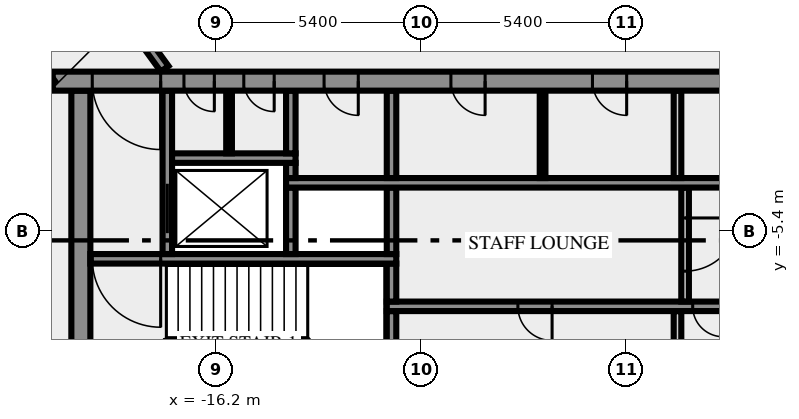
"""IFC4 building model, lengths in metres.
Left out: names, types, materials, properties, quantities, classifications, styles, units other than length and angle.
Written with IfcOpenShell. Run it as: python <this file> out.ifc"""

import sys

from ifc_helpers import new_model, si_unit, direction, frame, frame_2d, origin, place, context, subcontext, project, spatial, rectangle, extrude, element, fill, save


model = new_model("IFC4")
c1 = context("Model", 3, precision=1e-05, world=origin(), true_north=direction((0.0, 1.0)))
c2 = subcontext(c1, "Body", "Model", "MODEL_VIEW")
j1 = project(units=[si_unit("LENGTHUNIT", "METRE"), si_unit("PLANEANGLEUNIT", "RADIAN")], contexts=[c1])
p1 = place(None, origin())
s1 = spatial("IfcSite", under=j1, at=p1, CompositionType="ELEMENT")
p2 = place(p1, origin())
s2 = spatial("IfcBuilding", under=s1, at=p2, CompositionType="ELEMENT")
p3 = place(p2, frame((0.0, 0.0, 238.0)))
s3 = spatial("IfcBuildingStorey", under=s2, at=p3, CompositionType="ELEMENT", Elevation=238.0)
p4 = place(p3, frame((-19.75, -10.5, 0.0), z_axis=(0.0, 0.0, 1.0), x_axis=(0.0, 1.0, 0.0)))
e1 = element("IfcWall", 1, at=p4, inside=s3, PredefinedType="SHEAR", context=c2, shape_type="SweptSolid", body=[
    extrude(rectangle(XDim=8.8, YDim=0.5, at=frame_2d((4.4, 0.0))), origin(), (0.0, 0.0, 1.0), 3.4),
])
p5 = place(p3, frame((-11.575, -10.5, 0.0), z_axis=(0.0, 0.0, 1.0), x_axis=(0.0, 1.0, 0.0)))
e2 = element("IfcWall", 2, at=p5, inside=s3, PredefinedType="SHEAR", context=c2, shape_type="SweptSolid", body=[
    extrude(rectangle(XDim=3.0, YDim=0.25, at=frame_2d((1.5, 0.0))), origin(), (0.0, 0.0, 1.0), 3.4),
])
p6 = place(p3, frame((-4.05, -10.5, 0.0), z_axis=(0.0, 0.0, 1.0), x_axis=(0.0, 1.0, 0.0)))
e3 = element("IfcWall", 3, at=p6, inside=s3, PredefinedType="SOLIDWALL", context=c2, shape_type="SweptSolid", body=[
    extrude(rectangle(XDim=3.0, YDim=0.2, at=frame_2d((1.5, 0.0))), origin(), (0.0, 0.0, 1.0), 3.4),
])
p7 = place(p3, frame((11.7, -7.375, 0.0), z_axis=(0.0, 0.0, 1.0), x_axis=(-1.0, 0.0, 0.0)))
e4 = element("IfcWall", 4, at=p7, inside=s3, PredefinedType="SHEAR", context=c2, shape_type="SweptSolid", body=[
    extrude(rectangle(XDim=23.4, YDim=0.25, at=frame_2d((11.7, 0.0))), origin(), (0.0, 0.0, 1.0), 3.4),
])
p8 = place(p7, frame((19.05, 0.0, 0.0)))
e5 = element("IfcOpeningElement", 5, at=p8, cuts=e4, PredefinedType="OPENING", context=c2, shape_type="SweptSolid", body=[
    extrude(rectangle(XDim=0.9, YDim=2.1, at=frame_2d((0.45, 1.05))), frame((0.0, 0.135, 0.0), z_axis=(0.0, -1.0, 0.0), x_axis=(1.0, 0.0, 0.0)), (0.0, 0.0, 1.0), 0.27),
])
p9 = place(p7, frame((14.55, 0.0, 0.0)))
e6 = element("IfcOpeningElement", 6, at=p9, cuts=e4, PredefinedType="OPENING", context=c2, shape_type="SweptSolid", body=[
    extrude(rectangle(XDim=0.8, YDim=2.1, at=frame_2d((0.4, 1.05))), frame((0.0, 0.135, 0.0), z_axis=(0.0, -1.0, 0.0), x_axis=(1.0, 0.0, 0.0)), (0.0, 0.0, 1.0), 0.27),
])
p10 = place(p7, frame((12.8, 0.0, 0.0)))
e7 = element("IfcOpeningElement", 7, at=p10, cuts=e4, PredefinedType="OPENING", context=c2, shape_type="SweptSolid", body=[
    extrude(rectangle(XDim=0.9, YDim=2.1, at=frame_2d((0.45, 1.05))), frame((0.0, 0.135, 0.0), z_axis=(0.0, -1.0, 0.0), x_axis=(1.0, 0.0, 0.0)), (0.0, 0.0, 1.0), 0.27),
])
p11 = place(p7, frame((10.7, 0.0, 0.0)))
e8 = element("IfcOpeningElement", 8, at=p11, cuts=e4, PredefinedType="OPENING", context=c2, shape_type="SweptSolid", body=[
    extrude(rectangle(XDim=0.9, YDim=2.1, at=frame_2d((0.45, 1.05))), frame((0.0, 0.135, 0.0), z_axis=(0.0, -1.0, 0.0), x_axis=(1.0, 0.0, 0.0)), (0.0, 0.0, 1.0), 0.27),
])
p12 = place(p7, frame((8.35, 0.0, 0.0)))
e9 = element("IfcOpeningElement", 9, at=p12, cuts=e4, PredefinedType="OPENING", context=c2, shape_type="SweptSolid", body=[
    extrude(rectangle(XDim=1.1, YDim=2.1, at=frame_2d((0.55, 1.05))), frame((0.0, 0.135, 0.0), z_axis=(0.0, -1.0, 0.0), x_axis=(1.0, 0.0, 0.0)), (0.0, 0.0, 1.0), 0.27),
])
p13 = place(p7, frame((5.85, 0.0, 0.0)))
e10 = element("IfcOpeningElement", 10, at=p13, cuts=e4, PredefinedType="OPENING", context=c2, shape_type="SweptSolid", body=[
    extrude(rectangle(XDim=1.1, YDim=2.1, at=frame_2d((0.55, 1.05))), frame((0.0, 0.135, 0.0), z_axis=(0.0, -1.0, 0.0), x_axis=(1.0, 0.0, 0.0)), (0.0, 0.0, 1.0), 0.27),
])
p14 = place(p7, frame((3.35, 0.0, 0.0)))
e11 = element("IfcOpeningElement", 11, at=p14, cuts=e4, PredefinedType="OPENING", context=c2, shape_type="SweptSolid", body=[
    extrude(rectangle(XDim=1.1, YDim=2.1, at=frame_2d((0.55, 1.05))), frame((0.0, 0.135, 0.0), z_axis=(0.0, -1.0, 0.0), x_axis=(1.0, 0.0, 0.0)), (0.0, 0.0, 1.0), 0.27),
])
p15 = place(p7, frame((0.85, 0.0, 0.0)))
e12 = element("IfcOpeningElement", 12, at=p15, cuts=e4, PredefinedType="OPENING", context=c2, shape_type="SweptSolid", body=[
    extrude(rectangle(XDim=1.1, YDim=2.1, at=frame_2d((0.55, 1.05))), frame((0.0, 0.135, 0.0), z_axis=(0.0, -1.0, 0.0), x_axis=(1.0, 0.0, 0.0)), (0.0, 0.0, 1.0), 0.27),
])
p16 = place(p3, frame((-11.575, -7.25, 0.0), z_axis=(0.0, 0.0, 1.0), x_axis=(0.0, 1.0, 0.0)))
e13 = element("IfcWall", 13, at=p16, inside=s3, PredefinedType="SHEAR", context=c2, shape_type="SweptSolid", body=[
    extrude(rectangle(XDim=1.0, YDim=0.25, at=frame_2d((0.5, 0.0))), origin(), (0.0, 0.0, 1.0), 3.4),
])
p17 = place(p3, frame((-3.85, -4.25, 0.0), z_axis=(0.0, 0.0, 1.0), x_axis=(0.0, -1.0, 0.0)))
e14 = element("IfcWall", 14, at=p17, inside=s3, PredefinedType="SOLIDWALL", context=c2, shape_type="SweptSolid", body=[
    extrude(rectangle(XDim=3.0, YDim=0.2, at=frame_2d((1.5, 0.0))), origin(), (0.0, 0.0, 1.0), 3.4),
])
p18 = place(p17, frame((0.8, 0.0, 0.0)))
e15 = element("IfcOpeningElement", 15, at=p18, cuts=e14, PredefinedType="OPENING", context=c2, shape_type="SweptSolid", body=[
    extrude(rectangle(XDim=1.4, YDim=2.1, at=frame_2d((0.7, 1.05))), frame((0.0, 0.11, 0.0), z_axis=(0.0, -1.0, 0.0), x_axis=(1.0, 0.0, 0.0)), (0.0, 0.0, 1.0), 0.22),
])
p19 = place(p3, frame((-11.45, -6.125, 0.0), z_axis=(0.0, 0.0, 1.0), x_axis=(-1.0, 0.0, 0.0)))
e16 = element("IfcWall", 16, at=p19, inside=s3, PredefinedType="SHEAR", context=c2, shape_type="SweptSolid", body=[
    extrude(rectangle(XDim=8.05, YDim=0.25, at=frame_2d((4.025, 0.0))), origin(), (0.0, 0.0, 1.0), 3.4),
])
p20 = place(p19, frame((6.2, 0.0, 0.0)))
e17 = element("IfcOpeningElement", 17, at=p20, cuts=e16, PredefinedType="OPENING", context=c2, shape_type="SweptSolid", body=[
    extrude(rectangle(XDim=1.8, YDim=2.1, at=frame_2d((0.9, 1.05))), frame((0.0, 0.135, 0.0), z_axis=(0.0, -1.0, 0.0), x_axis=(1.0, 0.0, 0.0)), (0.0, 0.0, 1.0), 0.27),
])
p21 = place(p3, frame((-17.475, -6.0, 0.0), z_axis=(0.0, 0.0, 1.0), x_axis=(0.0, 1.0, 0.0)))
e18 = element("IfcWall", 18, at=p21, inside=s3, PredefinedType="SHEAR", context=c2, shape_type="SweptSolid", body=[
    extrude(rectangle(XDim=4.3, YDim=0.25, at=frame_2d((2.15, 0.0))), origin(), (0.0, 0.0, 1.0), 3.4),
])
p22 = place(p21, frame((0.55, 0.0, 0.0)))
e19 = element("IfcOpeningElement", 19, at=p22, cuts=e18, PredefinedType="OPENING", context=c2, shape_type="SweptSolid", body=[
    extrude(rectangle(XDim=1.3, YDim=2.1, at=frame_2d((0.65, 1.05))), frame((0.0, 0.135, 0.0), z_axis=(0.0, -1.0, 0.0), x_axis=(1.0, 0.0, 0.0)), (0.0, 0.0, 1.0), 0.27),
])
for number, where, z_axis, x_axis in (
    (20, (-14.225, -6.0, 0.0), (0.0, 0.0, 1.0), (0.0, 1.0, 0.0)),
    (21, (-11.575, -6.0, 0.0), (0.0, 0.0, 1.0), (0.0, 1.0, 0.0)),
):
    element("IfcWall", number, at=place(p3, frame(where, z_axis=z_axis, x_axis=x_axis)), inside=s3, PredefinedType="SHEAR", context=c2, shape_type="SweptSolid", body=[
        extrude(rectangle(XDim=1.75, YDim=0.25, at=frame_2d((0.875, 0.0))), origin(), (0.0, 0.0, 1.0), 3.4),
    ])
p23 = place(p3, frame((-14.35, -4.125, 0.0), z_axis=(0.0, 0.0, 1.0), x_axis=(1.0, 0.0, 0.0)))
e22 = element("IfcWall", 22, at=p23, inside=s3, PredefinedType="SHEAR", context=c2, shape_type="SweptSolid", body=[
    extrude(rectangle(XDim=12.7, YDim=0.25, at=frame_2d((6.35, 0.0))), origin(), (0.0, 0.0, 1.0), 3.4),
])
p24 = place(p3, frame((-14.225, -4.0, 0.0), z_axis=(0.0, 0.0, 1.0), x_axis=(0.0, 1.0, 0.0)))
e23 = element("IfcWall", 23, at=p24, inside=s3, PredefinedType="SHEAR", context=c2, shape_type="SweptSolid", body=[
    extrude(rectangle(XDim=0.4, YDim=0.25, at=frame_2d((0.2, 0.0))), origin(), (0.0, 0.0, 1.0), 3.4),
])
p25 = place(p3, frame((-11.575, -4.0, 0.0), z_axis=(0.0, 0.0, 1.0), x_axis=(0.0, 1.0, 0.0)))
e24 = element("IfcWall", 24, at=p25, inside=s3, PredefinedType="SHEAR", context=c2, shape_type="SweptSolid", body=[
    extrude(rectangle(XDim=2.3, YDim=0.25, at=frame_2d((1.15, 0.0))), origin(), (0.0, 0.0, 1.0), 3.4),
])
p26 = place(p3, frame((-7.6, -4.0, 0.0), z_axis=(0.0, 0.0, 1.0), x_axis=(0.0, 1.0, 0.0)))
e25 = element("IfcWall", 25, at=p26, inside=s3, PredefinedType="PARTITIONING", context=c2, shape_type="SweptSolid", body=[
    extrude(rectangle(XDim=2.3, YDim=0.15, at=frame_2d((1.15, 0.0))), origin(), (0.0, 0.0, 1.0), 3.4),
])
p27 = place(p3, frame((-4.05, -4.0, 0.0), z_axis=(0.0, 0.0, 1.0), x_axis=(0.0, 1.0, 0.0)))
e26 = element("IfcWall", 26, at=p27, inside=s3, PredefinedType="SOLIDWALL", context=c2, shape_type="SweptSolid", body=[
    extrude(rectangle(XDim=2.3, YDim=0.2, at=frame_2d((1.15, 0.0))), origin(), (0.0, 0.0, 1.0), 3.4),
])
p28 = place(p3, frame((-17.35, -3.475, 0.0), z_axis=(0.0, 0.0, 1.0), x_axis=(1.0, 0.0, 0.0)))
e27 = element("IfcWall", 27, at=p28, inside=s3, PredefinedType="SHEAR", context=c2, shape_type="SweptSolid", body=[
    extrude(rectangle(XDim=3.25, YDim=0.25, at=frame_2d((1.625, 0.0))), origin(), (0.0, 0.0, 1.0), 3.4),
])
p29 = place(p3, frame((-15.85, -3.35, 0.0), z_axis=(0.0, 0.0, 1.0), x_axis=(0.0, 1.0, 0.0)))
e28 = element("IfcWall", 28, at=p29, inside=s3, PredefinedType="PARTITIONING", context=c2, shape_type="SweptSolid", body=[
    extrude(rectangle(XDim=1.65, YDim=0.15, at=frame_2d((0.825, 0.0))), origin(), (0.0, 0.0, 1.0), 3.4),
])
p30 = place(p3, frame((-14.225, -3.35, 0.0), z_axis=(0.0, 0.0, 1.0), x_axis=(0.0, 1.0, 0.0)))
e29 = element("IfcWall", 29, at=p30, inside=s3, PredefinedType="SHEAR", context=c2, shape_type="SweptSolid", body=[
    extrude(rectangle(XDim=1.65, YDim=0.25, at=frame_2d((0.825, 0.0))), origin(), (0.0, 0.0, 1.0), 3.4),
])
p31 = place(p3, frame((20.49, -1.45, 0.0), z_axis=(0.0, 0.0, 1.0), x_axis=(-1.0, 0.0, 0.0)))
e30 = element("IfcWall", 30, at=p31, inside=s3, PredefinedType="SHEAR", context=c2, shape_type="SweptSolid", body=[
    extrude(rectangle(XDim=40.98, YDim=0.5, at=frame_2d((20.49, 0.0))), origin(), (0.0, 0.0, 1.0), 3.4),
])
p32 = place(p31, frame((38.14, 0.0, 0.0)))
e31 = element("IfcOpeningElement", 31, at=p32, cuts=e30, PredefinedType="OPENING", context=c2, shape_type="SweptSolid", body=[
    extrude(rectangle(XDim=1.8, YDim=2.1, at=frame_2d((0.9, 1.05))), frame((0.0, 0.26, 0.0), z_axis=(0.0, -1.0, 0.0), x_axis=(1.0, 0.0, 0.0)), (0.0, 0.0, 1.0), 0.52),
])
p33 = place(p31, frame((36.728, 0.0, 0.0)))
e32 = element("IfcOpeningElement", 32, at=p33, cuts=e30, PredefinedType="OPENING", context=c2, shape_type="SweptSolid", body=[
    extrude(rectangle(XDim=0.8, YDim=2.1, at=frame_2d((0.4, 1.05))), frame((0.0, 0.26, 0.0), z_axis=(0.0, -1.0, 0.0), x_axis=(1.0, 0.0, 0.0)), (0.0, 0.0, 1.0), 0.52),
])
p34 = place(p31, frame((35.153, 0.0, 0.0)))
e33 = element("IfcOpeningElement", 33, at=p34, cuts=e30, PredefinedType="OPENING", context=c2, shape_type="SweptSolid", body=[
    extrude(rectangle(XDim=0.8, YDim=2.1, at=frame_2d((0.4, 1.05))), frame((0.0, 0.26, 0.0), z_axis=(0.0, -1.0, 0.0), x_axis=(1.0, 0.0, 0.0)), (0.0, 0.0, 1.0), 0.52),
])
p35 = place(p31, frame((32.94, 0.0, 0.0)))
e34 = element("IfcOpeningElement", 34, at=p35, cuts=e30, PredefinedType="OPENING", context=c2, shape_type="SweptSolid", body=[
    extrude(rectangle(XDim=0.9, YDim=2.1, at=frame_2d((0.45, 1.05))), frame((0.0, 0.26, 0.0), z_axis=(0.0, -1.0, 0.0), x_axis=(1.0, 0.0, 0.0)), (0.0, 0.0, 1.0), 0.52),
])
p36 = place(p31, frame((29.603, 0.0, 0.0)))
e35 = element("IfcOpeningElement", 35, at=p36, cuts=e30, PredefinedType="OPENING", context=c2, shape_type="SweptSolid", body=[
    extrude(rectangle(XDim=0.9, YDim=2.1, at=frame_2d((0.45, 1.05))), frame((0.0, 0.26, 0.0), z_axis=(0.0, -1.0, 0.0), x_axis=(1.0, 0.0, 0.0)), (0.0, 0.0, 1.0), 0.52),
])
p37 = place(p31, frame((25.877, 0.0, 0.0)))
e36 = element("IfcOpeningElement", 36, at=p37, cuts=e30, PredefinedType="OPENING", context=c2, shape_type="SweptSolid", body=[
    extrude(rectangle(XDim=0.9, YDim=2.1, at=frame_2d((0.45, 1.05))), frame((0.0, 0.26, 0.0), z_axis=(0.0, -1.0, 0.0), x_axis=(1.0, 0.0, 0.0)), (0.0, 0.0, 1.0), 0.52),
])
p38 = place(p31, frame((19.59, 0.0, 0.0)))
e37 = element("IfcOpeningElement", 37, at=p38, cuts=e30, PredefinedType="OPENING", context=c2, shape_type="SweptSolid", body=[
    extrude(rectangle(XDim=2.0, YDim=2.1, at=frame_2d((1.0, 1.05))), frame((0.0, 0.26, 0.0), z_axis=(0.0, -1.0, 0.0), x_axis=(1.0, 0.0, 0.0)), (0.0, 0.0, 1.0), 0.52),
])
p39 = place(p31, frame((7.14, 0.0, 0.0)))
e38 = element("IfcOpeningElement", 38, at=p39, cuts=e30, PredefinedType="OPENING", context=c2, shape_type="SweptSolid", body=[
    extrude(rectangle(XDim=0.9, YDim=2.1, at=frame_2d((0.45, 1.05))), frame((0.0, 0.26, 0.0), z_axis=(0.0, -1.0, 0.0), x_axis=(1.0, 0.0, 0.0)), (0.0, 0.0, 1.0), 0.52),
])
p40 = place(p31, frame((4.19, 0.0, 0.0)))
e39 = element("IfcOpeningElement", 39, at=p40, cuts=e30, PredefinedType="OPENING", context=c2, shape_type="SweptSolid", body=[
    extrude(rectangle(XDim=0.9, YDim=2.1, at=frame_2d((0.45, 1.05))), frame((0.0, 0.26, 0.0), z_axis=(0.0, -1.0, 0.0), x_axis=(1.0, 0.0, 0.0)), (0.0, 0.0, 1.0), 0.52),
])
p41 = place(p31, frame((1.04, 0.0, 0.0)))
e40 = element("IfcOpeningElement", 40, at=p41, cuts=e30, PredefinedType="OPENING", context=c2, shape_type="SweptSolid", body=[
    extrude(rectangle(XDim=1.8, YDim=2.1, at=frame_2d((0.9, 1.05))), frame((0.0, 0.26, 0.0), z_axis=(0.0, -1.0, 0.0), x_axis=(1.0, 0.0, 0.0)), (0.0, 0.0, 1.0), 0.52),
])
p42 = place(p3, frame((-20.531, -1.523, 0.0), z_axis=(0.0, 0.0, 1.0), x_axis=(-0.587781654618, 0.809019608226, 0.0)))
e41 = element("IfcWall", 41, at=p42, inside=s3, PredefinedType="SOLIDWALL", context=c2, shape_type="SweptSolid", body=[
    extrude(rectangle(XDim=33.911, YDim=0.25, at=frame_2d((16.956, 0.0))), origin(), (0.0, 0.0, 1.0), 3.4),
])
p43 = place(p42, frame((14.216, 0.0, 0.0)))
e42 = element("IfcOpeningElement", 42, at=p43, cuts=e41, PredefinedType="OPENING", context=c2, shape_type="SweptSolid", body=[
    extrude(rectangle(XDim=1.0, YDim=2.1, at=frame_2d((0.5, 1.05))), frame((0.0, 0.135, 0.0), z_axis=(0.0, -1.0, 0.0), x_axis=(1.0, 0.0, 0.0)), (0.0, 0.0, 1.0), 0.27),
])
p44 = place(p42, frame((19.715, 0.0, 0.0)))
e43 = element("IfcOpeningElement", 43, at=p44, cuts=e41, PredefinedType="OPENING", context=c2, shape_type="SweptSolid", body=[
    extrude(rectangle(XDim=0.9, YDim=2.1, at=frame_2d((0.45, 1.05))), frame((0.0, 0.135, 0.0), z_axis=(0.0, -1.0, 0.0), x_axis=(1.0, 0.0, 0.0)), (0.0, 0.0, 1.0), 0.27),
])
p45 = place(p42, frame((21.316, 0.0, 0.0)))
e44 = element("IfcOpeningElement", 44, at=p45, cuts=e41, PredefinedType="OPENING", context=c2, shape_type="SweptSolid", body=[
    extrude(rectangle(XDim=0.9, YDim=2.1, at=frame_2d((0.45, 1.05))), frame((0.0, 0.135, 0.0), z_axis=(0.0, -1.0, 0.0), x_axis=(1.0, 0.0, 0.0)), (0.0, 0.0, 1.0), 0.27),
])
p46 = place(p3, frame((-38.32, 27.469, 0.0), z_axis=(0.0, 0.0, 1.0), x_axis=(0.587788021768, -0.809014982226, 0.0)))
e45 = element("IfcWall", 45, at=p46, inside=s3, PredefinedType="SOLIDWALL", context=c2, shape_type="SweptSolid", body=[
    extrude(rectangle(XDim=35.344, YDim=0.25, at=frame_2d((17.672, 0.0))), origin(), (0.0, 0.0, 1.0), 3.4),
])
p47 = place(p46, frame((31.003, 0.0, 0.0)))
e46 = element("IfcOpeningElement", 46, at=p47, cuts=e45, PredefinedType="OPENING", context=c2, shape_type="SweptSolid", body=[
    extrude(rectangle(XDim=0.9, YDim=2.1, at=frame_2d((0.45, 1.05))), frame((0.0, 0.135, 0.0), z_axis=(0.0, -1.0, 0.0), x_axis=(1.0, 0.0, 0.0)), (0.0, 0.0, 1.0), 0.27),
])
p48 = place(p46, frame((11.286, 0.0, 0.0)))
e47 = element("IfcOpeningElement", 47, at=p48, cuts=e45, PredefinedType="OPENING", context=c2, shape_type="SweptSolid", body=[
    extrude(rectangle(XDim=0.9, YDim=2.1, at=frame_2d((0.45, 1.05))), frame((0.0, 0.135, 0.0), z_axis=(0.0, -1.0, 0.0), x_axis=(1.0, 0.0, 0.0)), (0.0, 0.0, 1.0), 0.27),
])
p49 = place(p8, origin())
e48 = element("IfcDoor", 48, at=p49, inside=s3, OperationType="SINGLE_SWING_RIGHT", PredefinedType="DOOR", context=c2, shape_type="SweptSolid", body=[
    extrude(rectangle(XDim=0.9, YDim=2.1, at=frame_2d((0.45, 1.05))), frame((0.0, 0.025, 0.0), z_axis=(0.0, -1.0, 0.0), x_axis=(1.0, 0.0, 0.0)), (0.0, 0.0, 1.0), 0.05),
])
fill(e5, e48)
p50 = place(p9, origin())
e49 = element("IfcDoor", 49, at=p50, inside=s3, OperationType="SINGLE_SWING_RIGHT", PredefinedType="DOOR", context=c2, shape_type="SweptSolid", body=[
    extrude(rectangle(XDim=0.8, YDim=2.1, at=frame_2d((0.4, 1.05))), frame((0.0, 0.025, 0.0), z_axis=(0.0, -1.0, 0.0), x_axis=(1.0, 0.0, 0.0)), (0.0, 0.0, 1.0), 0.05),
])
fill(e6, e49)
p51 = place(p18, origin())
e50 = element("IfcDoor", 50, at=p51, inside=s3, OperationType="DOUBLE_DOOR_SINGLE_SWING", PredefinedType="DOOR", context=c2, shape_type="SweptSolid", body=[
    extrude(rectangle(XDim=1.4, YDim=2.1, at=frame_2d((0.7, 1.05))), frame((0.0, 0.025, 0.0), z_axis=(0.0, -1.0, 0.0), x_axis=(1.0, 0.0, 0.0)), (0.0, 0.0, 1.0), 0.05),
])
fill(e15, e50)
p52 = place(p20, origin())
e51 = element("IfcDoor", 51, at=p52, inside=s3, OperationType="DOUBLE_DOOR_SINGLE_SWING", PredefinedType="DOOR", context=c2, shape_type="SweptSolid", body=[
    extrude(rectangle(XDim=1.8, YDim=2.1, at=frame_2d((0.9, 1.05))), frame((0.0, 0.025, 0.0), z_axis=(0.0, -1.0, 0.0), x_axis=(1.0, 0.0, 0.0)), (0.0, 0.0, 1.0), 0.05),
])
fill(e17, e51)
p53 = place(p22, origin())
e52 = element("IfcDoor", 52, at=p53, inside=s3, OperationType="DOUBLE_DOOR_SLIDING", PredefinedType="DOOR", context=c2, shape_type="SweptSolid", body=[
    extrude(rectangle(XDim=1.3, YDim=2.1, at=frame_2d((0.65, 1.05))), frame((0.0, 0.025, 0.0), z_axis=(0.0, -1.0, 0.0), x_axis=(1.0, 0.0, 0.0)), (0.0, 0.0, 1.0), 0.05),
])
fill(e19, e52)
p54 = place(p32, origin())
e53 = element("IfcDoor", 53, at=p54, inside=s3, OperationType="DOUBLE_DOOR_SINGLE_SWING", PredefinedType="DOOR", context=c2, shape_type="SweptSolid", body=[
    extrude(rectangle(XDim=1.8, YDim=2.1, at=frame_2d((0.9, 1.05))), frame((0.0, 0.025, 0.0), z_axis=(0.0, -1.0, 0.0), x_axis=(1.0, 0.0, 0.0)), (0.0, 0.0, 1.0), 0.05),
])
fill(e31, e53)
p55 = place(p33, origin())
e54 = element("IfcDoor", 54, at=p55, inside=s3, OperationType="SINGLE_SWING_RIGHT", PredefinedType="DOOR", context=c2, shape_type="SweptSolid", body=[
    extrude(rectangle(XDim=0.8, YDim=2.1, at=frame_2d((0.4, 1.05))), frame((0.0, 0.025, 0.0), z_axis=(0.0, -1.0, 0.0), x_axis=(1.0, 0.0, 0.0)), (0.0, 0.0, 1.0), 0.05),
])
fill(e32, e54)
p56 = place(p34, origin())
e55 = element("IfcDoor", 55, at=p56, inside=s3, OperationType="SINGLE_SWING_RIGHT", PredefinedType="DOOR", context=c2, shape_type="SweptSolid", body=[
    extrude(rectangle(XDim=0.8, YDim=2.1, at=frame_2d((0.4, 1.05))), frame((0.0, 0.025, 0.0), z_axis=(0.0, -1.0, 0.0), x_axis=(1.0, 0.0, 0.0)), (0.0, 0.0, 1.0), 0.05),
])
fill(e33, e55)
p57 = place(p35, origin())
e56 = element("IfcDoor", 56, at=p57, inside=s3, OperationType="SINGLE_SWING_RIGHT", PredefinedType="DOOR", context=c2, shape_type="SweptSolid", body=[
    extrude(rectangle(XDim=0.9, YDim=2.1, at=frame_2d((0.45, 1.05))), frame((0.0, 0.025, 0.0), z_axis=(0.0, -1.0, 0.0), x_axis=(1.0, 0.0, 0.0)), (0.0, 0.0, 1.0), 0.05),
])
fill(e34, e56)
p58 = place(p36, origin())
e57 = element("IfcDoor", 57, at=p58, inside=s3, OperationType="SINGLE_SWING_RIGHT", PredefinedType="DOOR", context=c2, shape_type="SweptSolid", body=[
    extrude(rectangle(XDim=0.9, YDim=2.1, at=frame_2d((0.45, 1.05))), frame((0.0, 0.025, 0.0), z_axis=(0.0, -1.0, 0.0), x_axis=(1.0, 0.0, 0.0)), (0.0, 0.0, 1.0), 0.05),
])
fill(e35, e57)
p59 = place(p37, origin())
e58 = element("IfcDoor", 58, at=p59, inside=s3, OperationType="SINGLE_SWING_RIGHT", PredefinedType="DOOR", context=c2, shape_type="SweptSolid", body=[
    extrude(rectangle(XDim=0.9, YDim=2.1, at=frame_2d((0.45, 1.05))), frame((0.0, 0.025, 0.0), z_axis=(0.0, -1.0, 0.0), x_axis=(1.0, 0.0, 0.0)), (0.0, 0.0, 1.0), 0.05),
])
fill(e36, e58)
save(model, sys.argv[1])
